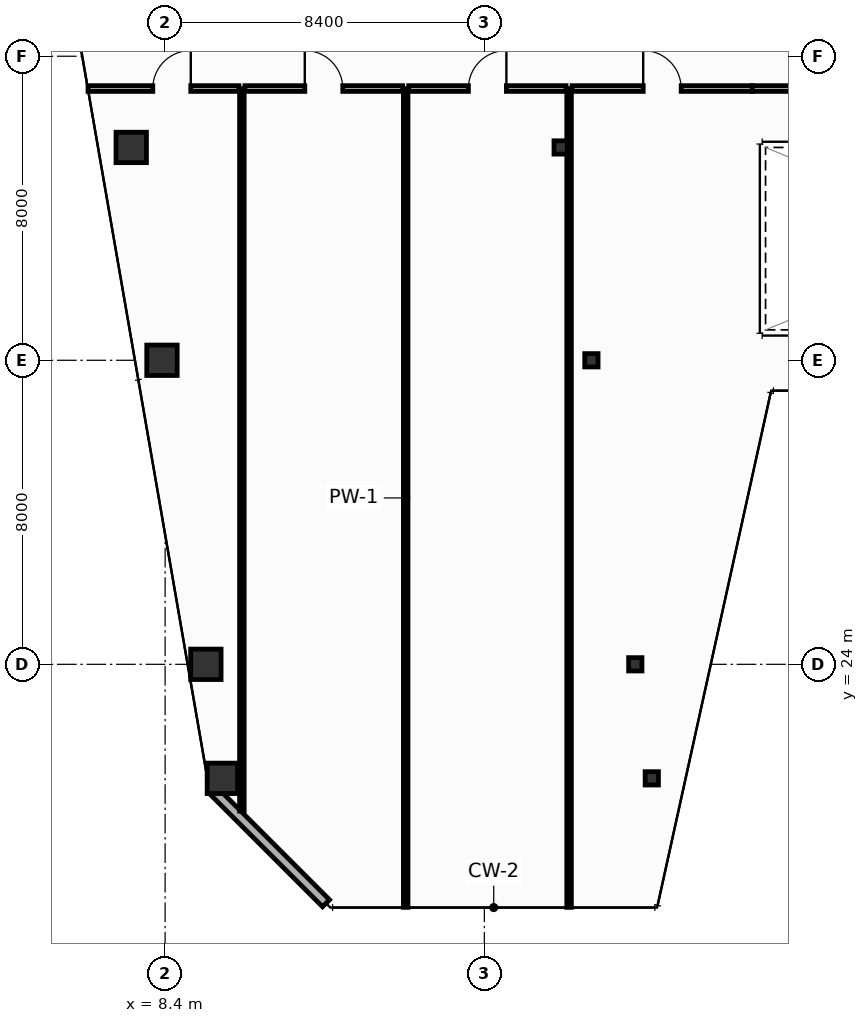
"""IFC4 building model, lengths in metres.
Left out: names, types, materials, properties, quantities, classifications, styles, units other than length and angle.
Written with IfcOpenShell. Run it as: python <this file> out.ifc"""

import sys

from ifc_helpers import new_model, si_unit, direction, frame, frame_2d, origin, origin_2d, place, context, subcontext, project, spatial, rectangle, hollow_rectangle, extrude, element, fill, save


model = new_model("IFC4")
c1 = context("Model", 3, precision=1e-05, world=origin(), true_north=direction((0.0, 1.0)))
c2 = subcontext(c1, "Body", "Model", "MODEL_VIEW")
j1 = project(units=[si_unit("LENGTHUNIT", "METRE"), si_unit("PLANEANGLEUNIT", "RADIAN")], contexts=[c1])
p1 = place(None, origin())
s1 = spatial("IfcSite", under=j1, at=p1, CompositionType="ELEMENT")
p2 = place(p1, origin())
s2 = spatial("IfcBuilding", under=s1, at=p2, CompositionType="ELEMENT")
p3 = place(p2, frame((0.0, 0.0, 238.2)))
s3 = spatial("IfcBuildingStorey", under=s2, at=p3, CompositionType="ELEMENT", Elevation=238.2)
p4 = place(p3, frame((9.906, 21.0, 0.0), z_axis=(0.0, 0.0, 1.0), x_axis=(1.0, 0.0, 0.0)))
e1 = element("IfcColumn", 1, at=p4, inside=s3, PredefinedType="COLUMN", context=c2, shape_type="SweptSolid", body=[
    extrude(hollow_rectangle(XDim=0.8, YDim=0.8, WallThickness=0.036, at=origin_2d()), origin(), (0.0, 0.0, 1.0), 3.8),
])
p5 = place(p3, frame((21.206, 21.0, 0.0), z_axis=(0.0, 0.0, 1.0), x_axis=(1.0, 0.0, 0.0)))
e2 = element("IfcColumn", 2, at=p5, inside=s3, PredefinedType="COLUMN", context=c2, shape_type="SweptSolid", body=[
    extrude(hollow_rectangle(XDim=0.35, YDim=0.35, WallThickness=0.016, at=origin_2d()), origin(), (0.0, 0.0, 1.0), 3.8),
])
p6 = place(p3, frame((9.472, 24.0, 0.0), z_axis=(0.0, 0.0, 1.0), x_axis=(1.0, 0.0, 0.0)))
e3 = element("IfcColumn", 3, at=p6, inside=s3, PredefinedType="COLUMN", context=c2, shape_type="SweptSolid", body=[
    extrude(hollow_rectangle(XDim=0.8, YDim=0.8, WallThickness=0.036, at=origin_2d()), origin(), (0.0, 0.0, 1.0), 3.8),
])
p7 = place(p3, frame((20.772, 24.0, 0.0), z_axis=(0.0, 0.0, 1.0), x_axis=(1.0, 0.0, 0.0)))
e4 = element("IfcColumn", 4, at=p7, inside=s3, PredefinedType="COLUMN", context=c2, shape_type="SweptSolid", body=[
    extrude(hollow_rectangle(XDim=0.35, YDim=0.35, WallThickness=0.016, at=origin_2d()), origin(), (0.0, 0.0, 1.0), 3.8),
])
p8 = place(p3, frame((8.317, 32.0, 0.0), z_axis=(0.0, 0.0, 1.0), x_axis=(1.0, 0.0, 0.0)))
e5 = element("IfcColumn", 5, at=p8, inside=s3, PredefinedType="COLUMN", context=c2, shape_type="SweptSolid", body=[
    extrude(hollow_rectangle(XDim=0.8, YDim=0.8, WallThickness=0.036, at=origin_2d()), origin(), (0.0, 0.0, 1.0), 3.8),
])
p9 = place(p3, frame((19.617, 32.0, 0.0), z_axis=(0.0, 0.0, 1.0), x_axis=(1.0, 0.0, 0.0)))
e6 = element("IfcColumn", 6, at=p9, inside=s3, PredefinedType="COLUMN", context=c2, shape_type="SweptSolid", body=[
    extrude(hollow_rectangle(XDim=0.35, YDim=0.35, WallThickness=0.016, at=origin_2d()), origin(), (0.0, 0.0, 1.0), 3.8),
])
p10 = place(p3, frame((7.508, 37.6, 0.0), z_axis=(0.0, 0.0, 1.0), x_axis=(1.0, 0.0, 0.0)))
e7 = element("IfcColumn", 7, at=p10, inside=s3, PredefinedType="COLUMN", context=c2, shape_type="SweptSolid", body=[
    extrude(hollow_rectangle(XDim=0.8, YDim=0.8, WallThickness=0.036, at=origin_2d()), origin(), (0.0, 0.0, 1.0), 3.8),
])
p11 = place(p3, frame((18.808, 37.6, 0.0), z_axis=(0.0, 0.0, 1.0), x_axis=(1.0, 0.0, 0.0)))
e8 = element("IfcColumn", 8, at=p11, inside=s3, PredefinedType="COLUMN", context=c2, shape_type="SweptSolid", body=[
    extrude(hollow_rectangle(XDim=0.35, YDim=0.35, WallThickness=0.016, at=origin_2d()), origin(), (0.0, 0.0, 1.0), 3.8),
])
p12 = place(p3, frame((9.66, 20.687, 0.0), z_axis=(0.0, 0.0, 1.0), x_axis=(0.70707775441, -0.707135806771, 0.0)))
e9 = element("IfcWall", 9, at=p12, inside=s3, PredefinedType="STANDARD", context=c2, shape_type="SweptSolid", body=[
    extrude(rectangle(XDim=4.206, YDim=0.26, at=frame_2d((2.103, 0.0))), origin(), (0.0, 0.0, 1.0), 3.55),
])
p13 = place(p3, frame((10.42, 20.139, 0.0), z_axis=(0.0, 0.0, 1.0), x_axis=(0.0, 1.0, 0.0)))
e10 = element("IfcWall", 10, at=p13, inside=s3, PredefinedType="PARTITIONING", context=c2, shape_type="SweptSolid", body=[
    extrude(rectangle(XDim=19.011, YDim=0.12, at=frame_2d((9.505, 0.0))), origin(), (0.0, 0.0, 1.0), 2.947),
])
for number, where, z_axis, x_axis in (
    (11, (14.73, 17.605, 0.0), (0.0, 0.0, 1.0), (0.0, 1.0, 0.0)),
    (12, (19.03, 17.605, 0.0), (0.0, 0.0, 1.0), (0.0, 1.0, 0.0)),
):
    element("IfcWall", number, at=place(p3, frame(where, z_axis=z_axis, x_axis=x_axis)), inside=s3, PredefinedType="PARTITIONING", context=c2, shape_type="SweptSolid", body=[
        extrude(rectangle(XDim=21.545, YDim=0.12, at=frame_2d((10.772, 0.0))), origin(), (0.0, 0.0, 1.0), 2.947),
    ])
p14 = place(p3, frame((6.371, 39.15, 0.0), z_axis=(0.0, 0.0, 1.0), x_axis=(1.0, 0.0, 0.0)))
e13 = element("IfcWall", 13, at=p14, inside=s3, PredefinedType="PARTITIONING", context=c2, shape_type="SweptSolid", body=[
    extrude(rectangle(XDim=3.969, YDim=0.15, at=frame_2d((1.984, 0.0))), origin(), (0.0, 0.0, 1.0), 3.085),
])
p15 = place(p14, frame((1.704, 0.0, 0.0)))
e14 = element("IfcOpeningElement", 14, at=p15, cuts=e13, PredefinedType="OPENING", context=c2, shape_type="SweptSolid", body=[
    extrude(rectangle(XDim=1.0, YDim=2.15, at=frame_2d((0.5, 1.075))), frame((0.0, 0.085, 0.0), z_axis=(0.0, -1.0, 0.0), x_axis=(1.0, 0.0, 0.0)), (0.0, 0.0, 1.0), 0.17),
])
p16 = place(p3, frame((10.5, 39.15, 0.0), z_axis=(0.0, 0.0, 1.0), x_axis=(1.0, 0.0, 0.0)))
e15 = element("IfcWall", 15, at=p16, inside=s3, PredefinedType="PARTITIONING", context=c2, shape_type="SweptSolid", body=[
    extrude(rectangle(XDim=4.15, YDim=0.15, at=frame_2d((2.075, 0.0))), origin(), (0.0, 0.0, 1.0), 3.55),
])
p17 = place(p16, frame((1.575, 0.0, 0.0)))
e16 = element("IfcOpeningElement", 16, at=p17, cuts=e15, PredefinedType="OPENING", context=c2, shape_type="SweptSolid", body=[
    extrude(rectangle(XDim=1.0, YDim=2.15, at=frame_2d((0.5, 1.075))), frame((0.0, 0.085, 0.0), z_axis=(0.0, -1.0, 0.0), x_axis=(1.0, 0.0, 0.0)), (0.0, 0.0, 1.0), 0.17),
])
p18 = place(p3, frame((14.81, 39.15, 0.0), z_axis=(0.0, 0.0, 1.0), x_axis=(1.0, 0.0, 0.0)))
e17 = element("IfcWall", 17, at=p18, inside=s3, PredefinedType="PARTITIONING", context=c2, shape_type="SweptSolid", body=[
    extrude(rectangle(XDim=4.14, YDim=0.15, at=frame_2d((2.07, 0.0))), origin(), (0.0, 0.0, 1.0), 3.55),
])
p19 = place(p18, frame((1.57, 0.0, 0.0)))
e18 = element("IfcOpeningElement", 18, at=p19, cuts=e17, PredefinedType="OPENING", context=c2, shape_type="SweptSolid", body=[
    extrude(rectangle(XDim=1.0, YDim=2.15, at=frame_2d((0.5, 1.075))), frame((0.0, 0.085, 0.0), z_axis=(0.0, -1.0, 0.0), x_axis=(1.0, 0.0, 0.0)), (0.0, 0.0, 1.0), 0.17),
])
p20 = place(p3, frame((19.11, 39.15, 0.0), z_axis=(0.0, 0.0, 1.0), x_axis=(1.0, 0.0, 0.0)))
e19 = element("IfcWall", 19, at=p20, inside=s3, PredefinedType="PARTITIONING", context=c2, shape_type="SweptSolid", body=[
    extrude(rectangle(XDim=4.74, YDim=0.15, at=frame_2d((2.37, 0.0))), origin(), (0.0, 0.0, 1.0), 2.947),
])
p21 = place(p20, frame((1.87, 0.0, 0.0)))
e20 = element("IfcOpeningElement", 20, at=p21, cuts=e19, PredefinedType="OPENING", context=c2, shape_type="SweptSolid", body=[
    extrude(rectangle(XDim=1.0, YDim=2.15, at=frame_2d((0.5, 1.075))), frame((0.0, 0.085, 0.0), z_axis=(0.0, -1.0, 0.0), x_axis=(1.0, 0.0, 0.0)), (0.0, 0.0, 1.0), 0.17),
])
p22 = place(p3, frame((23.85, 39.15, 0.0), z_axis=(0.0, 0.0, 1.0), x_axis=(1.0, 0.0, 0.0)))
e21 = element("IfcWall", 21, at=p22, inside=s3, PredefinedType="PARTITIONING", context=c2, shape_type="SweptSolid", body=[
    extrude(rectangle(XDim=12.3, YDim=0.15, at=frame_2d((6.15, 0.0))), origin(), (0.0, 0.0, 1.0), 3.55),
])
p23 = place(p15, origin())
e22 = element("IfcDoor", 22, at=p23, inside=s3, OperationType="SINGLE_SWING_RIGHT", PredefinedType="DOOR", context=c2, shape_type="SweptSolid", body=[
    extrude(rectangle(XDim=1.0, YDim=2.15, at=frame_2d((0.5, 1.075))), frame((0.0, 0.025, 0.0), z_axis=(0.0, -1.0, 0.0), x_axis=(1.0, 0.0, 0.0)), (0.0, 0.0, 1.0), 0.05),
])
fill(e14, e22)
p24 = place(p17, origin())
e23 = element("IfcDoor", 23, at=p24, inside=s3, OperationType="SINGLE_SWING_LEFT", PredefinedType="DOOR", context=c2, shape_type="SweptSolid", body=[
    extrude(rectangle(XDim=1.0, YDim=2.15, at=frame_2d((0.5, 1.075))), frame((0.0, 0.025, 0.0), z_axis=(0.0, -1.0, 0.0), x_axis=(1.0, 0.0, 0.0)), (0.0, 0.0, 1.0), 0.05),
])
fill(e16, e23)
p25 = place(p19, origin())
e24 = element("IfcDoor", 24, at=p25, inside=s3, OperationType="SINGLE_SWING_RIGHT", PredefinedType="DOOR", context=c2, shape_type="SweptSolid", body=[
    extrude(rectangle(XDim=1.0, YDim=2.15, at=frame_2d((0.5, 1.075))), frame((0.0, 0.025, 0.0), z_axis=(0.0, -1.0, 0.0), x_axis=(1.0, 0.0, 0.0)), (0.0, 0.0, 1.0), 0.05),
])
fill(e18, e24)
p26 = place(p21, origin())
e25 = element("IfcDoor", 25, at=p26, inside=s3, OperationType="SINGLE_SWING_LEFT", PredefinedType="DOOR", context=c2, shape_type="SweptSolid", body=[
    extrude(rectangle(XDim=1.0, YDim=2.15, at=frame_2d((0.5, 1.075))), frame((0.0, 0.025, 0.0), z_axis=(0.0, -1.0, 0.0), x_axis=(1.0, 0.0, 0.0)), (0.0, 0.0, 1.0), 0.05),
])
fill(e20, e25)
save(model, sys.argv[1])
